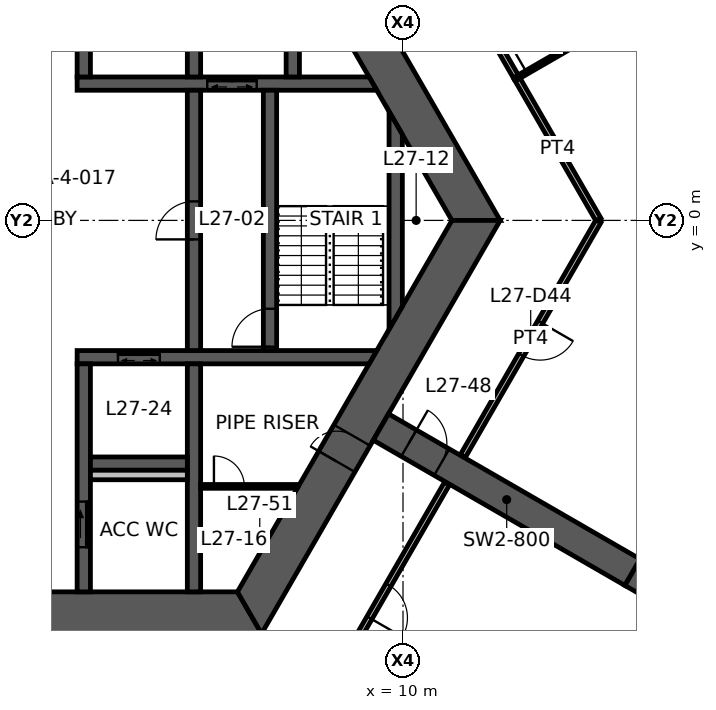
"""IFC4 building model, lengths in metres.
Left out: names, types, materials, properties, quantities, classifications, styles, units other than length and angle.
Written with IfcOpenShell. Run it as: python <this file> out.ifc"""

import sys

from ifc_helpers import new_model, si_unit, direction, frame, frame_2d, origin, place, context, subcontext, project, spatial, polyline, rectangle, outline, extrude, element, fill, save


model = new_model("IFC4")
c1 = context("Model", 3, precision=1e-05, world=origin(), true_north=direction((0.0, 1.0)))
c2 = subcontext(c1, "Body", "Model", "MODEL_VIEW")
j1 = project(units=[si_unit("LENGTHUNIT", "METRE"), si_unit("PLANEANGLEUNIT", "RADIAN")], contexts=[c1])
p1 = place(None, origin())
s1 = spatial("IfcSite", under=j1, at=p1, CompositionType="ELEMENT")
p2 = place(p1, origin())
s2 = spatial("IfcBuilding", under=s1, at=p2, CompositionType="ELEMENT")
p3 = place(p2, frame((0.0, 0.0, 108.0)))
s3 = spatial("IfcBuildingStorey", under=s2, at=p3, CompositionType="ELEMENT", Elevation=108.0)
p4 = place(p3, frame((11.922, 0.0, 0.0), z_axis=(0.0, 0.0, 1.0), x_axis=(-0.500004296715, 0.866022923061, 0.0)))
e1 = element("IfcWall", 1, at=p4, inside=s3, PredefinedType="SHEAR", context=c2, shape_type="SweptSolid", body=[
    extrude(outline(polyline([(-0.318, -0.55), (5.835, -0.55), (6.635, -0.55), (12.24, -0.55), (11.605, 0.55), (6.635, 0.55), (5.835, 0.55), (0.318, 0.55), (-0.318, -0.55)])), origin(), (0.0, 0.0, 1.0), 3.9),
])
p5 = place(p4, frame((5.835, 0.0, 0.0)))
e2 = element("IfcOpeningElement", 2, at=p5, cuts=e1, PredefinedType="OPENING", context=c2, shape_type="SweptSolid", body=[
    extrude(rectangle(XDim=0.8, YDim=2.1, at=frame_2d((0.4, 1.05))), frame((0.0, 0.56, 0.0), z_axis=(0.0, -1.0, 0.0), x_axis=(1.0, 0.0, 0.0)), (0.0, 0.0, 1.0), 1.12),
])
p6 = place(p3, frame((-5.961, -10.325, 0.0), z_axis=(0.0, 0.0, 1.0), x_axis=(1.0, 0.0, 0.0)))
e3 = element("IfcWall", 3, at=p6, inside=s3, PredefinedType="SHEAR", context=c2, shape_type="SweptSolid", body=[
    extrude(outline(polyline([(-0.318, -0.55), (5.461, -0.55), (6.461, -0.55), (12.24, -0.55), (11.605, 0.55), (6.461, 0.55), (5.461, 0.55), (0.318, 0.55), (-0.318, -0.55)])), origin(), (0.0, 0.0, 1.0), 3.9),
])
p7 = place(p6, frame((5.461, 0.0, 0.0)))
e4 = element("IfcOpeningElement", 4, at=p7, cuts=e3, PredefinedType="OPENING", context=c2, shape_type="SweptSolid", body=[
    extrude(rectangle(XDim=1.0, YDim=2.1, at=frame_2d((0.5, 1.05))), frame((0.0, 0.56, 0.0), z_axis=(0.0, -1.0, 0.0), x_axis=(1.0, 0.0, 0.0)), (0.0, 0.0, 1.0), 1.12),
])
p8 = place(p3, frame((5.961, -10.325, 0.0), z_axis=(0.0, 0.0, 1.0), x_axis=(0.500004296715, 0.866022923061, 0.0)))
e5 = element("IfcWall", 5, at=p8, inside=s3, PredefinedType="SHEAR", context=c2, shape_type="SweptSolid", body=[
    extrude(outline(polyline([(-0.318, -0.55), (4.594, -0.55), (5.394, -0.55), (12.24, -0.55), (11.605, 0.55), (5.394, 0.55), (4.594, 0.55), (0.318, 0.55), (-0.318, -0.55)])), origin(), (0.0, 0.0, 1.0), 3.9),
])
p9 = place(p8, frame((4.594, 0.0, 0.0)))
e6 = element("IfcOpeningElement", 6, at=p9, cuts=e5, PredefinedType="OPENING", context=c2, shape_type="SweptSolid", body=[
    extrude(rectangle(XDim=0.8, YDim=2.1, at=frame_2d((0.4, 1.05))), frame((0.0, 0.56, 0.0), z_axis=(0.0, -1.0, 0.0), x_axis=(1.0, 0.0, 0.0)), (0.0, 0.0, 1.0), 1.12),
])
p10 = place(p3, frame((9.418, -5.438, 0.0), z_axis=(0.0, 0.0, 1.0), x_axis=(0.866029782078, -0.499992416496, 0.0)))
e7 = element("IfcWall", 7, at=p10, inside=s3, PredefinedType="SHEAR", context=c2, shape_type="SweptSolid", body=[
    extrude(rectangle(XDim=7.646, YDim=0.8, at=frame_2d((3.823, 0.0))), origin(), (0.0, 0.0, 1.0), 3.9),
])
p11 = place(p10, frame((0.85, 0.0, 0.0)))
e8 = element("IfcOpeningElement", 8, at=p11, cuts=e7, PredefinedType="OPENING", context=c2, shape_type="SweptSolid", body=[
    extrude(rectangle(XDim=1.0, YDim=2.1, at=frame_2d((0.5, 1.05))), frame((0.0, 0.41, 0.0), z_axis=(0.0, -1.0, 0.0), x_axis=(1.0, 0.0, 0.0)), (0.0, 0.0, 1.0), 0.82),
])
p12 = place(p3, frame((16.039, -9.26, 0.0), z_axis=(0.0, 0.0, 1.0), x_axis=(0.866024837091, -0.50000098154, 0.0)))
e9 = element("IfcWall", 9, at=p12, inside=s3, PredefinedType="SHEAR", context=c2, shape_type="SweptSolid", body=[
    extrude(rectangle(XDim=13.0, YDim=0.8, at=frame_2d((6.5, 0.0))), origin(), (0.0, 0.0, 1.0), 3.9),
])
p13 = place(p3, frame((1.425, 3.6, 0.0), z_axis=(0.0, 0.0, 1.0), x_axis=(1.0, 0.0, 0.0)))
e10 = element("IfcWall", 10, at=p13, inside=s3, PredefinedType="SHEAR", context=c2, shape_type="SweptSolid", body=[
    extrude(outline(polyline([(0.0, -0.175), (3.425, -0.175), (4.725, -0.175), (7.885, -0.175), (7.683, 0.175), (4.725, 0.175), (3.425, 0.175), (0.0, 0.175), (0.0, -0.175)])), origin(), (0.0, 0.0, 1.0), 3.9),
])
p14 = place(p13, frame((3.425, 0.0, 0.0)))
e11 = element("IfcOpeningElement", 11, at=p14, cuts=e10, PredefinedType="OPENING", context=c2, shape_type="SweptSolid", body=[
    extrude(rectangle(XDim=1.3, YDim=2.1, at=frame_2d((0.65, 1.05))), frame((0.0, 0.185, 0.0), z_axis=(0.0, -1.0, 0.0), x_axis=(1.0, 0.0, 0.0)), (0.0, 0.0, 1.0), 0.37),
])
p15 = place(p3, frame((1.425, -3.6, 0.0), z_axis=(0.0, 0.0, 1.0), x_axis=(1.0, 0.0, 0.0)))
e12 = element("IfcWall", 12, at=p15, inside=s3, PredefinedType="SHEAR", context=c2, shape_type="SweptSolid", body=[
    extrude(outline(polyline([(0.0, -0.175), (1.075, -0.175), (2.175, -0.175), (7.683, -0.175), (7.885, 0.175), (2.175, 0.175), (1.075, 0.175), (0.0, 0.175), (0.0, -0.175)])), origin(), (0.0, 0.0, 1.0), 3.9),
])
p16 = place(p15, frame((1.075, 0.0, 0.0)))
e13 = element("IfcOpeningElement", 13, at=p16, cuts=e12, PredefinedType="OPENING", context=c2, shape_type="SweptSolid", body=[
    extrude(rectangle(XDim=1.1, YDim=2.1, at=frame_2d((0.55, 1.05))), frame((0.0, 0.185, 0.0), z_axis=(0.0, -1.0, 0.0), x_axis=(1.0, 0.0, 0.0)), (0.0, 0.0, 1.0), 0.37),
])
p17 = place(p3, frame((1.6, 3.775, 0.0), z_axis=(0.0, 0.0, 1.0), x_axis=(0.0, 1.0, 0.0)))
e14 = element("IfcWall", 14, at=p17, inside=s3, PredefinedType="SHEAR", context=c2, shape_type="SweptSolid", body=[
    extrude(rectangle(XDim=6.0, YDim=0.35, at=frame_2d((3.0, 0.0))), origin(), (0.0, 0.0, 1.0), 3.9),
])
p18 = place(p17, frame((3.775, 0.0, 0.0)))
e15 = element("IfcOpeningElement", 15, at=p18, cuts=e14, PredefinedType="OPENING", context=c2, shape_type="SweptSolid", body=[
    extrude(rectangle(XDim=0.9, YDim=2.1, at=frame_2d((0.45, 1.05))), frame((0.0, 0.185, 0.0), z_axis=(0.0, -1.0, 0.0), x_axis=(1.0, 0.0, 0.0)), (0.0, 0.0, 1.0), 0.37),
])
p19 = place(p3, frame((1.6, -3.775, 0.0), z_axis=(0.0, 0.0, 1.0), x_axis=(0.0, -1.0, 0.0)))
e16 = element("IfcWall", 16, at=p19, inside=s3, PredefinedType="SHEAR", context=c2, shape_type="SweptSolid", body=[
    extrude(rectangle(XDim=6.0, YDim=0.35, at=frame_2d((3.0, 0.0))), origin(), (0.0, 0.0, 1.0), 3.9),
])
p20 = place(p19, frame((3.625, 0.0, 0.0)))
e17 = element("IfcOpeningElement", 17, at=p20, cuts=e16, PredefinedType="OPENING", context=c2, shape_type="SweptSolid", body=[
    extrude(rectangle(XDim=1.2, YDim=2.1, at=frame_2d((0.6, 1.05))), frame((0.0, 0.185, 0.0), z_axis=(0.0, -1.0, 0.0), x_axis=(1.0, 0.0, 0.0)), (0.0, 0.0, 1.0), 0.37),
])
p21 = place(p3, frame((4.5, -3.425, 0.0), z_axis=(0.0, 0.0, 1.0), x_axis=(0.0, 1.0, 0.0)))
e18 = element("IfcWall", 18, at=p21, inside=s3, PredefinedType="SHEAR", context=c2, shape_type="SweptSolid", body=[
    extrude(rectangle(XDim=6.85, YDim=0.35, at=frame_2d((3.425, 0.0))), origin(), (0.0, 0.0, 1.0), 3.9),
])
p22 = place(p21, frame((2.925, 0.0, 0.0)))
e19 = element("IfcOpeningElement", 19, at=p22, cuts=e18, PredefinedType="OPENING", context=c2, shape_type="SweptSolid", body=[
    extrude(rectangle(XDim=1.0, YDim=2.1, at=frame_2d((0.5, 1.05))), frame((0.0, 0.185, 0.0), z_axis=(0.0, -1.0, 0.0), x_axis=(1.0, 0.0, 0.0)), (0.0, 0.0, 1.0), 0.37),
])
p23 = place(p3, frame((6.5, -3.425, 0.0), z_axis=(0.0, 0.0, 1.0), x_axis=(0.0, 1.0, 0.0)))
e20 = element("IfcWall", 20, at=p23, inside=s3, PredefinedType="SHEAR", context=c2, shape_type="SweptSolid", body=[
    extrude(rectangle(XDim=6.85, YDim=0.35, at=frame_2d((3.425, 0.0))), origin(), (0.0, 0.0, 1.0), 3.9),
])
p24 = place(p23, frame((0.1, 0.0, 0.0)))
e21 = element("IfcOpeningElement", 21, at=p24, cuts=e20, PredefinedType="OPENING", context=c2, shape_type="SweptSolid", body=[
    extrude(rectangle(XDim=1.0, YDim=2.1, at=frame_2d((0.5, 1.05))), frame((0.0, 0.185, 0.0), z_axis=(0.0, -1.0, 0.0), x_axis=(1.0, 0.0, 0.0)), (0.0, 0.0, 1.0), 0.37),
])
p25 = place(p3, frame((4.5, 3.775, 0.0), z_axis=(0.0, 0.0, 1.0), x_axis=(0.0, 1.0, 0.0)))
e22 = element("IfcWall", 22, at=p25, inside=s3, PredefinedType="SHEAR", context=c2, shape_type="SweptSolid", body=[
    extrude(rectangle(XDim=3.4, YDim=0.35, at=frame_2d((1.7, 0.0))), origin(), (0.0, 0.0, 1.0), 3.9),
])
p26 = place(p3, frame((4.5, -3.775, 0.0), z_axis=(0.0, 0.0, 1.0), x_axis=(0.0, -1.0, 0.0)))
e23 = element("IfcWall", 23, at=p26, inside=s3, PredefinedType="SHEAR", context=c2, shape_type="SweptSolid", body=[
    extrude(rectangle(XDim=6.0, YDim=0.35, at=frame_2d((3.0, 0.0))), origin(), (0.0, 0.0, 1.0), 3.9),
])
p27 = place(p3, frame((1.775, -6.4, 0.0), z_axis=(0.0, 0.0, 1.0), x_axis=(1.0, 0.0, 0.0)))
e24 = element("IfcWall", 24, at=p27, inside=s3, PredefinedType="SHEAR", context=c2, shape_type="SweptSolid", body=[
    extrude(rectangle(XDim=2.55, YDim=0.35, at=frame_2d((1.275, 0.0))), origin(), (0.0, 0.0, 1.0), 3.9),
])
p28 = place(p3, frame((7.1, 3.775, 0.0), z_axis=(0.0, 0.0, 1.0), x_axis=(0.0, 1.0, 0.0)))
e25 = element("IfcWall", 25, at=p28, inside=s3, PredefinedType="SHEAR", context=c2, shape_type="SweptSolid", body=[
    extrude(outline(polyline([(0.0, -0.175), (3.175, -0.175), (3.4, 0.0), (3.4, 0.175), (0.0, 0.175), (0.0, -0.175)])), origin(), (0.0, 0.0, 1.0), 3.9),
])
p29 = place(p3, frame((9.808, -2.562, 0.0), z_axis=(0.0, 0.0, 1.0), x_axis=(0.0, 1.0, 0.0)))
e26 = element("IfcWall", 26, at=p29, inside=s3, PredefinedType="SHEAR", context=c2, shape_type="SweptSolid", body=[
    extrude(outline(polyline([(0.303, -0.175), (4.821, -0.175), (5.428, 0.175), (-0.303, 0.175), (0.303, -0.175)])), origin(), (0.0, 0.0, 1.0), 3.9),
])
p30 = place(p3, frame((1.775, -6.7, 0.0), z_axis=(0.0, 0.0, 1.0), x_axis=(1.0, 0.0, 0.0)))
e27 = element("IfcWall", 27, at=p30, inside=s3, PredefinedType="PLUMBINGWALL", context=c2, shape_type="SweptSolid", body=[
    extrude(rectangle(XDim=2.55, YDim=0.25, at=frame_2d((1.275, 0.0))), origin(), (0.0, 0.0, 1.0), 3.9),
])
p31 = place(p3, frame((4.675, -7.0, 0.0), z_axis=(0.0, 0.0, 1.0), x_axis=(1.0, 0.0, 0.0)))
e28 = element("IfcWall", 28, at=p31, inside=s3, PredefinedType="PARTITIONING", context=c2, shape_type="SweptSolid", body=[
    extrude(outline(polyline([(0.0, -0.05), (0.35, -0.05), (1.15, -0.05), (2.542, -0.05), (2.571, 0.0), (2.577, 0.05), (1.15, 0.05), (0.35, 0.05), (0.0, 0.05), (0.0, -0.05)])), origin(), (0.0, 0.0, 1.0), 2.95),
])
p32 = place(p31, frame((0.35, 0.0, 0.0)))
e29 = element("IfcOpeningElement", 29, at=p32, cuts=e28, PredefinedType="OPENING", context=c2, shape_type="SweptSolid", body=[
    extrude(rectangle(XDim=0.8, YDim=2.1, at=frame_2d((0.4, 1.05))), frame((0.0, 0.06, 0.0), z_axis=(0.0, -1.0, 0.0), x_axis=(1.0, 0.0, 0.0)), (0.0, 0.0, 1.0), 0.12),
])
p33 = place(p3, frame((12.987, 3.755, 0.0), z_axis=(0.0, 0.0, 1.0), x_axis=(0.499980509014, -0.866036656618, 0.0)))
e30 = element("IfcWall", 30, at=p33, inside=s3, PredefinedType="PARTITIONING", context=c2, shape_type="SweptSolid", body=[
    extrude(rectangle(XDim=4.313, YDim=0.15, at=frame_2d((2.157, 0.0))), origin(), (0.0, 0.0, 1.0), 2.95),
])
p34 = place(p3, frame((10.664, 7.779, 0.0), z_axis=(0.0, 0.0, 1.0), x_axis=(0.500008456887, -0.866020521143, 0.0)))
e31 = element("IfcWall", 31, at=p34, inside=s3, PredefinedType="PARTITIONING", context=c2, shape_type="SweptSolid", body=[
    extrude(rectangle(XDim=4.655, YDim=0.15, at=frame_2d((2.328, 0.0))), origin(), (0.0, 0.0, 1.0), 2.95),
])
p35 = place(p34, frame((1.828, 0.0, 0.0)))
e32 = element("IfcOpeningElement", 32, at=p35, cuts=e31, PredefinedType="OPENING", context=c2, shape_type="SweptSolid", body=[
    extrude(rectangle(XDim=1.0, YDim=2.1, at=frame_2d((0.5, 1.05))), frame((0.0, 0.085, 0.0), z_axis=(0.0, -1.0, 0.0), x_axis=(1.0, 0.0, 0.0)), (0.0, 0.0, 1.0), 0.17),
])
p36 = place(p3, frame((12.992, 3.747, 0.0), z_axis=(0.0, 0.0, 1.0), x_axis=(0.865555596133, 0.500812849279, 0.0)))
e33 = element("IfcWall", 33, at=p36, inside=s3, PredefinedType="PARTITIONING", context=c2, shape_type="SweptSolid", body=[
    extrude(rectangle(XDim=4.696, YDim=0.1, at=frame_2d((2.348, 0.0))), origin(), (0.0, 0.0, 1.0), 2.95),
])
p37 = place(p36, frame((0.3, 0.0, 0.0)))
e34 = element("IfcOpeningElement", 34, at=p37, cuts=e33, PredefinedType="OPENING", context=c2, shape_type="SweptSolid", body=[
    extrude(rectangle(XDim=0.9, YDim=2.1, at=frame_2d((0.45, 1.05))), frame((0.0, 0.06, 0.0), z_axis=(0.0, -1.0, 0.0), x_axis=(1.0, 0.0, 0.0)), (0.0, 0.0, 1.0), 0.12),
])
p38 = place(p3, frame((15.144, -0.02, 0.0), z_axis=(0.0, 0.0, 1.0), x_axis=(-0.499985098601, -0.86603400694, 0.0)))
e35 = element("IfcWall", 35, at=p38, inside=s3, PredefinedType="PARTITIONING", context=c2, shape_type="SweptSolid", body=[
    extrude(rectangle(XDim=7.135, YDim=0.15, at=frame_2d((3.567, 0.0))), origin(), (0.0, 0.0, 1.0), 2.95),
])
p39 = place(p38, frame((3.067, 0.0, 0.0)))
e36 = element("IfcOpeningElement", 36, at=p39, cuts=e35, PredefinedType="OPENING", context=c2, shape_type="SweptSolid", body=[
    extrude(rectangle(XDim=1.0, YDim=2.1, at=frame_2d((0.5, 1.05))), frame((0.0, 0.085, 0.0), z_axis=(0.0, -1.0, 0.0), x_axis=(1.0, 0.0, 0.0)), (0.0, 0.0, 1.0), 0.17),
])
p40 = place(p3, frame((11.156, -6.926, 0.0), z_axis=(0.0, 0.0, 1.0), x_axis=(-0.500001961223, -0.866024271469, 0.0)))
e37 = element("IfcWall", 37, at=p40, inside=s3, PredefinedType="PARTITIONING", context=c2, shape_type="SweptSolid", body=[
    extrude(rectangle(XDim=7.158, YDim=0.15, at=frame_2d((3.579, 0.0))), origin(), (0.0, 0.0, 1.0), 2.95),
])
p41 = place(p40, frame((3.079, 0.0, 0.0)))
e38 = element("IfcOpeningElement", 38, at=p41, cuts=e37, PredefinedType="OPENING", context=c2, shape_type="SweptSolid", body=[
    extrude(rectangle(XDim=1.0, YDim=2.1, at=frame_2d((0.5, 1.05))), frame((0.0, 0.085, 0.0), z_axis=(0.0, -1.0, 0.0), x_axis=(1.0, 0.0, 0.0)), (0.0, 0.0, 1.0), 0.17),
])
p42 = place(p9, origin())
e39 = element("IfcDoor", 39, at=p42, inside=s3, OperationType="SINGLE_SWING_LEFT", PredefinedType="DOOR", context=c2, shape_type="SweptSolid", body=[
    extrude(rectangle(XDim=0.8, YDim=2.1, at=frame_2d((0.4, 1.05))), frame((0.0, 0.025, 0.0), z_axis=(0.0, -1.0, 0.0), x_axis=(1.0, 0.0, 0.0)), (0.0, 0.0, 1.0), 0.05),
])
fill(e6, e39)
p43 = place(p22, origin())
e40 = element("IfcDoor", 40, at=p43, inside=s3, OperationType="SINGLE_SWING_LEFT", PredefinedType="DOOR", context=c2, shape_type="SweptSolid", body=[
    extrude(rectangle(XDim=1.0, YDim=2.1, at=frame_2d((0.5, 1.05))), frame((0.0, 0.025, 0.0), z_axis=(0.0, -1.0, 0.0), x_axis=(1.0, 0.0, 0.0)), (0.0, 0.0, 1.0), 0.05),
])
fill(e19, e40)
p44 = place(p24, origin())
e41 = element("IfcDoor", 41, at=p44, inside=s3, OperationType="SINGLE_SWING_LEFT", PredefinedType="DOOR", context=c2, shape_type="SweptSolid", body=[
    extrude(rectangle(XDim=1.0, YDim=2.1, at=frame_2d((0.5, 1.05))), frame((0.0, 0.025, 0.0), z_axis=(0.0, -1.0, 0.0), x_axis=(1.0, 0.0, 0.0)), (0.0, 0.0, 1.0), 0.05),
])
fill(e21, e41)
p45 = place(p20, origin())
e42 = element("IfcDoor", 42, at=p45, inside=s3, OperationType="SLIDING_TO_LEFT", PredefinedType="DOOR", context=c2, shape_type="SweptSolid", body=[
    extrude(rectangle(XDim=1.2, YDim=2.1, at=frame_2d((0.6, 1.05))), frame((0.0, 0.025, 0.0), z_axis=(0.0, -1.0, 0.0), x_axis=(1.0, 0.0, 0.0)), (0.0, 0.0, 1.0), 0.05),
])
fill(e17, e42)
p46 = place(p11, origin())
e43 = element("IfcDoor", 43, at=p46, inside=s3, OperationType="SINGLE_SWING_LEFT", PredefinedType="DOOR", context=c2, shape_type="SweptSolid", body=[
    extrude(rectangle(XDim=1.0, YDim=2.1, at=frame_2d((0.5, 1.05))), frame((0.0, 0.025, 0.0), z_axis=(0.0, -1.0, 0.0), x_axis=(1.0, 0.0, 0.0)), (0.0, 0.0, 1.0), 0.05),
])
fill(e8, e43)
p47 = place(p32, origin())
e44 = element("IfcDoor", 44, at=p47, inside=s3, OperationType="SINGLE_SWING_LEFT", PredefinedType="DOOR", context=c2, shape_type="SweptSolid", body=[
    extrude(rectangle(XDim=0.8, YDim=2.1, at=frame_2d((0.4, 1.05))), frame((0.0, 0.025, 0.0), z_axis=(0.0, -1.0, 0.0), x_axis=(1.0, 0.0, 0.0)), (0.0, 0.0, 1.0), 0.05),
])
fill(e29, e44)
p48 = place(p37, origin())
e45 = element("IfcDoor", 45, at=p48, inside=s3, OperationType="SINGLE_SWING_LEFT", PredefinedType="DOOR", context=c2, shape_type="SweptSolid", body=[
    extrude(rectangle(XDim=0.9, YDim=2.1, at=frame_2d((0.45, 1.05))), frame((0.0, 0.025, 0.0), z_axis=(0.0, -1.0, 0.0), x_axis=(1.0, 0.0, 0.0)), (0.0, 0.0, 1.0), 0.05),
])
fill(e34, e45)
p49 = place(p39, origin())
e46 = element("IfcDoor", 46, at=p49, inside=s3, OperationType="SINGLE_SWING_LEFT", PredefinedType="DOOR", context=c2, shape_type="SweptSolid", body=[
    extrude(rectangle(XDim=1.0, YDim=2.1, at=frame_2d((0.5, 1.05))), frame((0.0, 0.025, 0.0), z_axis=(0.0, -1.0, 0.0), x_axis=(1.0, 0.0, 0.0)), (0.0, 0.0, 1.0), 0.05),
])
fill(e36, e46)
p50 = place(p41, origin())
e47 = element("IfcDoor", 47, at=p50, inside=s3, OperationType="SINGLE_SWING_RIGHT", PredefinedType="DOOR", context=c2, shape_type="SweptSolid", body=[
    extrude(rectangle(XDim=1.0, YDim=2.1, at=frame_2d((0.5, 1.05))), frame((0.0, 0.025, 0.0), z_axis=(0.0, -1.0, 0.0), x_axis=(1.0, 0.0, 0.0)), (0.0, 0.0, 1.0), 0.05),
])
fill(e38, e47)
p51 = place(p16, origin())
e48 = element("IfcDoor", 48, at=p51, inside=s3, OperationType="DOUBLE_DOOR_SLIDING", PredefinedType="DOOR", context=c2, shape_type="SweptSolid", body=[
    extrude(rectangle(XDim=1.1, YDim=2.1, at=frame_2d((0.55, 1.05))), frame((0.0, 0.025, 0.0), z_axis=(0.0, -1.0, 0.0), x_axis=(1.0, 0.0, 0.0)), (0.0, 0.0, 1.0), 0.05),
])
fill(e13, e48)
p52 = place(p14, origin())
e49 = element("IfcDoor", 49, at=p52, inside=s3, OperationType="DOUBLE_DOOR_SLIDING", PredefinedType="DOOR", context=c2, shape_type="SweptSolid", body=[
    extrude(rectangle(XDim=1.3, YDim=2.1, at=frame_2d((0.65, 1.05))), frame((0.0, 0.025, 0.0), z_axis=(0.0, -1.0, 0.0), x_axis=(1.0, 0.0, 0.0)), (0.0, 0.0, 1.0), 0.05),
])
fill(e11, e49)
save(model, sys.argv[1])
